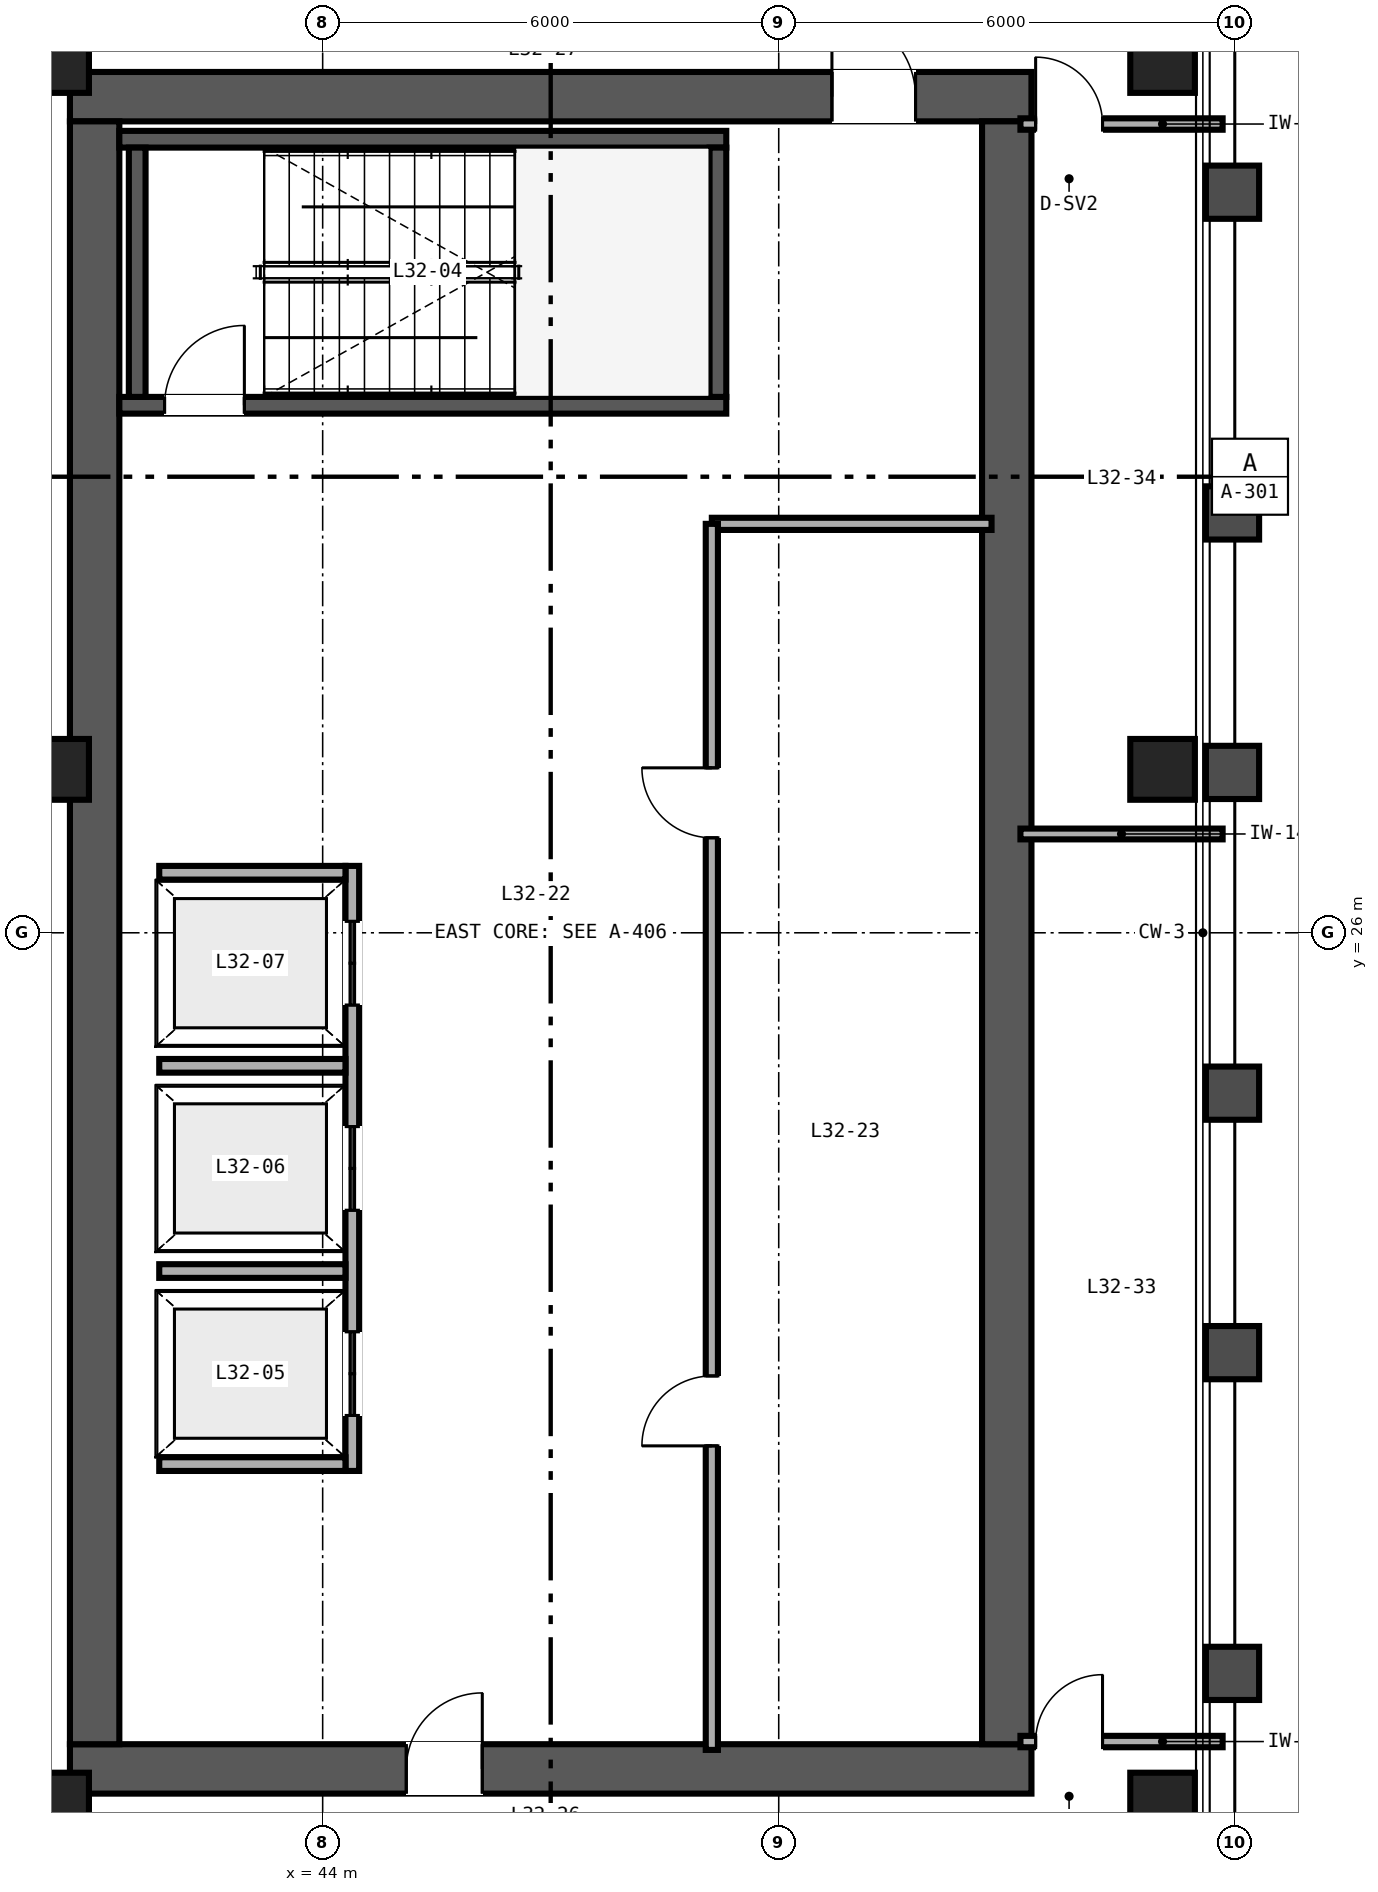
"""IFC4 building model, lengths in metres.
Left out: names, types, materials, properties, quantities, classifications, styles, units other than length and angle.
Written with IfcOpenShell. Run it as: python <this file> out.ifc"""

import sys

from ifc_helpers import new_model, si_unit, direction, frame, frame_2d, origin, origin_2d, place, context, subcontext, project, spatial, rectangle, hollow_rectangle, extrude, source, transform, mapped, element, fill, save


model = new_model("IFC4")
c1 = context("Model", 3, precision=1e-05, world=origin(), true_north=direction((0.0, 1.0)))
c2 = subcontext(c1, "Body", "Model", "MODEL_VIEW")
j1 = project(units=[si_unit("LENGTHUNIT", "METRE"), si_unit("PLANEANGLEUNIT", "RADIAN")], contexts=[c1])
p1 = place(None, origin())
s1 = spatial("IfcSite", under=j1, at=p1, CompositionType="ELEMENT")
p2 = place(p1, origin())
s2 = spatial("IfcBuilding", under=s1, at=p2, CompositionType="ELEMENT")
p3 = place(p2, frame((0.0, 0.0, 129.6)))
s3 = spatial("IfcBuildingStorey", under=s2, at=p3, CompositionType="ELEMENT", Elevation=129.6)
p4 = place(p3, frame((40.675, 15.0, 0.0), z_axis=(0.0, 0.0, 1.0), x_axis=(1.0, 0.0, 0.0)))
e1 = element("IfcWall", 1, at=p4, inside=s3, PredefinedType="SHEAR", context=c2, shape_type="SweptSolid", body=[
    extrude(rectangle(XDim=12.65, YDim=0.65, at=frame_2d((6.325, 0.0))), origin(), (0.0, 0.0, 1.0), 3.36),
])
p5 = place(p4, frame((4.425, 0.0, 0.0)))
e2 = element("IfcOpeningElement", 2, at=p5, cuts=e1, PredefinedType="OPENING", context=c2, shape_type="SweptSolid", body=[
    extrude(rectangle(XDim=1.0, YDim=2.15, at=frame_2d((0.5, 1.075))), frame((0.0, 0.335, 0.0), z_axis=(0.0, -1.0, 0.0), x_axis=(1.0, 0.0, 0.0)), (0.0, 0.0, 1.0), 0.67),
])
p6 = place(p3, frame((40.675, 37.0, 0.0), z_axis=(0.0, 0.0, 1.0), x_axis=(1.0, 0.0, 0.0)))
e3 = element("IfcWall", 3, at=p6, inside=s3, PredefinedType="SHEAR", context=c2, shape_type="SweptSolid", body=[
    extrude(rectangle(XDim=12.65, YDim=0.65, at=frame_2d((6.325, 0.0))), origin(), (0.0, 0.0, 1.0), 3.36),
])
p7 = place(p6, frame((10.025, 0.0, 0.0)))
e4 = element("IfcOpeningElement", 4, at=p7, cuts=e3, PredefinedType="OPENING", context=c2, shape_type="SweptSolid", body=[
    extrude(rectangle(XDim=1.1, YDim=2.15, at=frame_2d((0.55, 1.075))), frame((0.0, 0.335, 0.0), z_axis=(0.0, -1.0, 0.0), x_axis=(1.0, 0.0, 0.0)), (0.0, 0.0, 1.0), 0.67),
])
for number, where, z_axis, x_axis in (
    (5, (41.0, 15.325, 0.0), (0.0, 0.0, 1.0), (0.0, 1.0, 0.0)),
    (6, (53.0, 15.325, 0.0), (0.0, 0.0, 1.0), (0.0, 1.0, 0.0)),
):
    element("IfcWall", number, at=place(p3, frame(where, z_axis=z_axis, x_axis=x_axis)), inside=s3, PredefinedType="SHEAR", context=c2, shape_type="SweptSolid", body=[
        extrude(rectangle(XDim=21.35, YDim=0.65, at=frame_2d((10.675, 0.0))), origin(), (0.0, 0.0, 1.0), 3.36),
    ])
p8 = place(p3, frame((41.325, 32.94, 0.0), z_axis=(0.0, 0.0, 1.0), x_axis=(1.0, 0.0, 0.0)))
e7 = element("IfcWall", 7, at=p8, inside=s3, PredefinedType="SHEAR", context=c2, shape_type="SweptSolid", body=[
    extrude(rectangle(XDim=7.985, YDim=0.22, at=frame_2d((3.993, 0.0))), origin(), (0.0, 0.0, 1.0), 3.4),
])
p9 = place(p8, frame((0.595, 0.0, 0.0)))
e8 = element("IfcOpeningElement", 8, at=p9, cuts=e7, PredefinedType="OPENING", context=c2, shape_type="SweptSolid", body=[
    extrude(rectangle(XDim=1.05, YDim=2.15, at=frame_2d((0.525, 1.075))), frame((0.0, 0.12, 0.0), z_axis=(0.0, -1.0, 0.0), x_axis=(1.0, 0.0, 0.0)), (0.0, 0.0, 1.0), 0.24),
])
p10 = place(p3, frame((41.325, 36.44, 0.0), z_axis=(0.0, 0.0, 1.0), x_axis=(1.0, 0.0, 0.0)))
e9 = element("IfcWall", 9, at=p10, inside=s3, PredefinedType="SHEAR", context=c2, shape_type="SweptSolid", body=[
    extrude(rectangle(XDim=7.985, YDim=0.22, at=frame_2d((3.993, 0.0))), origin(), (0.0, 0.0, 1.0), 3.4),
])
for number, where, z_axis, x_axis in (
    (10, (41.56, 33.05, 0.0), (0.0, 0.0, 1.0), (0.0, 1.0, 0.0)),
    (11, (49.2, 33.05, 0.0), (0.0, 0.0, 1.0), (0.0, 1.0, 0.0)),
):
    element("IfcWall", number, at=place(p3, frame(where, z_axis=z_axis, x_axis=x_axis)), inside=s3, PredefinedType="SHEAR", context=c2, shape_type="SweptSolid", body=[
        extrude(rectangle(XDim=3.28, YDim=0.22, at=frame_2d((1.64, 0.0))), origin(), (0.0, 0.0, 1.0), 3.4),
    ])
m1 = source(origin(), c2, "Body", "SweptSolid", [
    extrude(hollow_rectangle(XDim=0.85, YDim=0.8, WallThickness=0.032, at=origin_2d()), origin(), (0.0, 0.0, 1.0), 3.36),
])
for number, where, z_axis, x_axis in (
    (12, (40.5, 14.55, 0.0), (0.0, 0.0, 1.0), (1.0, 0.0, 0.0)),
    (13, (55.05, 14.55, 0.0), (0.0, 0.0, 1.0), (1.0, 0.0, 0.0)),
    (14, (40.5, 28.15, 0.0), (0.0, 0.0, 1.0), (1.0, 0.0, 0.0)),
    (15, (55.05, 28.15, 0.0), (0.0, 0.0, 1.0), (1.0, 0.0, 0.0)),
    (16, (40.5, 37.45, 0.0), (0.0, 0.0, 1.0), (1.0, 0.0, 0.0)),
    (17, (55.05, 37.45, 0.0), (0.0, 0.0, 1.0), (1.0, 0.0, 0.0)),
):
    element("IfcColumn", number, at=place(p3, frame(where, z_axis=z_axis, x_axis=x_axis)), inside=s3, PredefinedType="COLUMN", context=c2, shape_type="MappedRepresentation", body=[
        mapped(m1, transform((0.0, 0.0, 0.0), scale=1.0)),
    ])
p11 = place(p3, frame((44.39, 18.92, 0.0), z_axis=(0.0, 0.0, 1.0), x_axis=(0.0, 1.0, 0.0)))
e18 = element("IfcWall", 18, at=p11, inside=s3, PredefinedType="SOLIDWALL", context=c2, shape_type="SweptSolid", body=[
    extrude(rectangle(XDim=7.96, YDim=0.18, at=frame_2d((3.98, 0.0))), origin(), (0.0, 0.0, 1.0), 3.36),
])
p12 = place(p11, frame((0.73, 0.0, 0.0)))
e19 = element("IfcOpeningElement", 19, at=p12, cuts=e18, PredefinedType="OPENING", context=c2, shape_type="SweptSolid", body=[
    extrude(rectangle(XDim=1.1, YDim=2.2, at=frame_2d((0.55, 1.1))), frame((0.0, 0.1, 0.0), z_axis=(0.0, -1.0, 0.0), x_axis=(1.0, 0.0, 0.0)), (0.0, 0.0, 1.0), 0.2),
])
p13 = place(p11, frame((3.43, 0.0, 0.0)))
e20 = element("IfcOpeningElement", 20, at=p13, cuts=e18, PredefinedType="OPENING", context=c2, shape_type="SweptSolid", body=[
    extrude(rectangle(XDim=1.1, YDim=2.2, at=frame_2d((0.55, 1.1))), frame((0.0, 0.1, 0.0), z_axis=(0.0, -1.0, 0.0), x_axis=(1.0, 0.0, 0.0)), (0.0, 0.0, 1.0), 0.2),
])
p14 = place(p11, frame((6.13, 0.0, 0.0)))
e21 = element("IfcOpeningElement", 21, at=p14, cuts=e18, PredefinedType="OPENING", context=c2, shape_type="SweptSolid", body=[
    extrude(rectangle(XDim=1.1, YDim=2.2, at=frame_2d((0.55, 1.1))), frame((0.0, 0.1, 0.0), z_axis=(0.0, -1.0, 0.0), x_axis=(1.0, 0.0, 0.0)), (0.0, 0.0, 1.0), 0.2),
])
for number, where, z_axis, x_axis in (
    (22, (41.85, 19.01, 0.0), (0.0, 0.0, 1.0), (1.0, 0.0, 0.0)),
    (23, (41.85, 26.79, 0.0), (0.0, 0.0, 1.0), (1.0, 0.0, 0.0)),
    (24, (41.85, 21.55, 0.0), (0.0, 0.0, 1.0), (1.0, 0.0, 0.0)),
    (25, (41.85, 24.25, 0.0), (0.0, 0.0, 1.0), (1.0, 0.0, 0.0)),
):
    element("IfcWall", number, at=place(p3, frame(where, z_axis=z_axis, x_axis=x_axis)), inside=s3, PredefinedType="SOLIDWALL", context=c2, shape_type="SweptSolid", body=[
        extrude(rectangle(XDim=2.45, YDim=0.18, at=frame_2d((1.225, 0.0))), origin(), (0.0, 0.0, 1.0), 3.36),
    ])
p15 = place(p3, frame((49.12, 31.38, 0.0), z_axis=(0.0, 0.0, 1.0), x_axis=(1.0, 0.0, 0.0)))
e26 = element("IfcWall", 26, at=p15, inside=s3, PredefinedType="PARTITIONING", context=c2, shape_type="SweptSolid", body=[
    extrude(rectangle(XDim=3.68, YDim=0.16, at=frame_2d((1.84, 0.0))), origin(), (0.0, 0.0, 1.0), 2.36),
])
p16 = place(p3, frame((49.12, 15.25, 0.0), z_axis=(0.0, 0.0, 1.0), x_axis=(0.0, 1.0, 0.0)))
e27 = element("IfcWall", 27, at=p16, inside=s3, PredefinedType="PARTITIONING", context=c2, shape_type="SweptSolid", body=[
    extrude(rectangle(XDim=16.13, YDim=0.16, at=frame_2d((8.065, 0.0))), origin(), (0.0, 0.0, 1.0), 2.36),
])
p17 = place(p16, frame((4.0, 0.0, 0.0)))
e28 = element("IfcOpeningElement", 28, at=p17, cuts=e27, PredefinedType="OPENING", context=c2, shape_type="SweptSolid", body=[
    extrude(rectangle(XDim=0.92, YDim=2.15, at=frame_2d((0.46, 1.075))), frame((0.0, 0.09, 0.0), z_axis=(0.0, -1.0, 0.0), x_axis=(1.0, 0.0, 0.0)), (0.0, 0.0, 1.0), 0.18),
])
p18 = place(p16, frame((12.0, 0.0, 0.0)))
e29 = element("IfcOpeningElement", 29, at=p18, cuts=e27, PredefinedType="OPENING", context=c2, shape_type="SweptSolid", body=[
    extrude(rectangle(XDim=0.92, YDim=2.15, at=frame_2d((0.46, 1.075))), frame((0.0, 0.09, 0.0), z_axis=(0.0, -1.0, 0.0), x_axis=(1.0, 0.0, 0.0)), (0.0, 0.0, 1.0), 0.18),
])
p19 = place(p3, frame((53.18, 15.36, 0.0), z_axis=(0.0, 0.0, 1.0), x_axis=(1.0, 0.0, 0.0)))
e30 = element("IfcWall", 30, at=p19, inside=s3, PredefinedType="PARTITIONING", context=c2, shape_type="SweptSolid", body=[
    extrude(rectangle(XDim=2.66, YDim=0.15, at=frame_2d((1.33, 0.0))), origin(), (0.0, 0.0, 1.0), 2.581),
])
p20 = place(p19, frame((0.2, 0.0, 0.0)))
e31 = element("IfcOpeningElement", 31, at=p20, cuts=e30, PredefinedType="OPENING", context=c2, shape_type="SweptSolid", body=[
    extrude(rectangle(XDim=0.88, YDim=2.15, at=frame_2d((0.44, 1.075))), frame((0.0, 0.085, 0.0), z_axis=(0.0, -1.0, 0.0), x_axis=(1.0, 0.0, 0.0)), (0.0, 0.0, 1.0), 0.17),
])
p21 = place(p3, frame((53.18, 36.64, 0.0), z_axis=(0.0, 0.0, 1.0), x_axis=(1.0, 0.0, 0.0)))
e32 = element("IfcWall", 32, at=p21, inside=s3, PredefinedType="PARTITIONING", context=c2, shape_type="SweptSolid", body=[
    extrude(rectangle(XDim=2.66, YDim=0.15, at=frame_2d((1.33, 0.0))), origin(), (0.0, 0.0, 1.0), 2.743),
])
p22 = place(p21, frame((0.2, 0.0, 0.0)))
e33 = element("IfcOpeningElement", 33, at=p22, cuts=e32, PredefinedType="OPENING", context=c2, shape_type="SweptSolid", body=[
    extrude(rectangle(XDim=0.88, YDim=2.15, at=frame_2d((0.44, 1.075))), frame((0.0, 0.085, 0.0), z_axis=(0.0, -1.0, 0.0), x_axis=(1.0, 0.0, 0.0)), (0.0, 0.0, 1.0), 0.17),
])
p23 = place(p3, frame((53.18, 27.3, 0.0), z_axis=(0.0, 0.0, 1.0), x_axis=(1.0, 0.0, 0.0)))
e34 = element("IfcWall", 34, at=p23, inside=s3, PredefinedType="PARTITIONING", context=c2, shape_type="SweptSolid", body=[
    extrude(rectangle(XDim=2.66, YDim=0.142, at=frame_2d((1.33, 0.0))), origin(), (0.0, 0.0, 1.0), 2.581),
])
m2 = source(origin(), c2, "Body", "SweptSolid", [
    extrude(rectangle(XDim=1.05, YDim=2.15, at=frame_2d((0.525, 1.075))), frame((0.0, 0.025, 0.0), z_axis=(0.0, -1.0, 0.0), x_axis=(1.0, 0.0, 0.0)), (0.0, 0.0, 1.0), 0.05),
])
p24 = place(p9, origin())
e35 = element("IfcDoor", 35, at=p24, inside=s3, OperationType="SINGLE_SWING_RIGHT", PredefinedType="DOOR", context=c2, shape_type="MappedRepresentation", body=[
    mapped(m2, transform((0.0, 0.0, 0.0), scale=1.0)),
])
fill(e8, e35)
m3 = source(origin(), c2, "Body", "SweptSolid", [
    extrude(rectangle(XDim=1.1, YDim=2.2, at=frame_2d((0.55, 1.1))), frame((0.0, 0.025, 0.0), z_axis=(0.0, -1.0, 0.0), x_axis=(1.0, 0.0, 0.0)), (0.0, 0.0, 1.0), 0.05),
])
p25 = place(p12, origin())
e36 = element("IfcDoor", 36, at=p25, inside=s3, OperationType="DOUBLE_DOOR_SLIDING", PredefinedType="DOOR", context=c2, shape_type="MappedRepresentation", body=[
    mapped(m3, transform((0.0, 0.0, 0.0), scale=1.0)),
])
fill(e19, e36)
p26 = place(p13, origin())
e37 = element("IfcDoor", 37, at=p26, inside=s3, OperationType="DOUBLE_DOOR_SLIDING", PredefinedType="DOOR", context=c2, shape_type="MappedRepresentation", body=[
    mapped(m3, transform((0.0, 0.0, 0.0), scale=1.0)),
])
fill(e20, e37)
p27 = place(p14, origin())
e38 = element("IfcDoor", 38, at=p27, inside=s3, OperationType="DOUBLE_DOOR_SLIDING", PredefinedType="DOOR", context=c2, shape_type="MappedRepresentation", body=[
    mapped(m3, transform((0.0, 0.0, 0.0), scale=1.0)),
])
fill(e21, e38)
m4 = source(origin(), c2, "Body", "SweptSolid", [
    extrude(rectangle(XDim=1.0, YDim=2.15, at=frame_2d((0.5, 1.075))), frame((0.0, 0.025, 0.0), z_axis=(0.0, -1.0, 0.0), x_axis=(1.0, 0.0, 0.0)), (0.0, 0.0, 1.0), 0.05),
])
p28 = place(p5, origin())
e39 = element("IfcDoor", 39, at=p28, inside=s3, OperationType="SINGLE_SWING_RIGHT", PredefinedType="DOOR", context=c2, shape_type="MappedRepresentation", body=[
    mapped(m4, transform((0.0, 0.0, 0.0), scale=1.0)),
])
fill(e2, e39)
m5 = source(origin(), c2, "Body", "SweptSolid", [
    extrude(rectangle(XDim=1.1, YDim=2.15, at=frame_2d((0.55, 1.075))), frame((0.0, 0.025, 0.0), z_axis=(0.0, -1.0, 0.0), x_axis=(1.0, 0.0, 0.0)), (0.0, 0.0, 1.0), 0.05),
])
p29 = place(p7, origin())
e40 = element("IfcDoor", 40, at=p29, inside=s3, OperationType="SINGLE_SWING_LEFT", PredefinedType="DOOR", context=c2, shape_type="MappedRepresentation", body=[
    mapped(m5, transform((0.0, 0.0, 0.0), scale=1.0)),
])
fill(e4, e40)
m6 = source(origin(), c2, "Body", "SweptSolid", [
    extrude(rectangle(XDim=0.92, YDim=2.15, at=frame_2d((0.46, 1.075))), frame((0.0, 0.025, 0.0), z_axis=(0.0, -1.0, 0.0), x_axis=(1.0, 0.0, 0.0)), (0.0, 0.0, 1.0), 0.05),
])
p30 = place(p17, origin())
e41 = element("IfcDoor", 41, at=p30, inside=s3, OperationType="SINGLE_SWING_LEFT", PredefinedType="DOOR", context=c2, shape_type="MappedRepresentation", body=[
    mapped(m6, transform((0.0, 0.0, 0.0), scale=1.0)),
])
fill(e28, e41)
p31 = place(p18, origin())
e42 = element("IfcDoor", 42, at=p31, inside=s3, OperationType="SINGLE_SWING_RIGHT", PredefinedType="DOOR", context=c2, shape_type="MappedRepresentation", body=[
    mapped(m6, transform((0.0, 0.0, 0.0), scale=1.0)),
])
fill(e29, e42)
m7 = source(origin(), c2, "Body", "SweptSolid", [
    extrude(rectangle(XDim=0.88, YDim=2.15, at=frame_2d((0.44, 1.075))), frame((0.0, 0.025, 0.0), z_axis=(0.0, -1.0, 0.0), x_axis=(1.0, 0.0, 0.0)), (0.0, 0.0, 1.0), 0.05),
])
p32 = place(p20, origin())
e43 = element("IfcDoor", 43, at=p32, inside=s3, OperationType="SINGLE_SWING_RIGHT", PredefinedType="DOOR", context=c2, shape_type="MappedRepresentation", body=[
    mapped(m7, transform((0.0, 0.0, 0.0), scale=1.0)),
])
fill(e31, e43)
p33 = place(p22, origin())
e44 = element("IfcDoor", 44, at=p33, inside=s3, OperationType="SINGLE_SWING_LEFT", PredefinedType="DOOR", context=c2, shape_type="MappedRepresentation", body=[
    mapped(m7, transform((0.0, 0.0, 0.0), scale=1.0)),
])
fill(e33, e44)
save(model, sys.argv[1])
